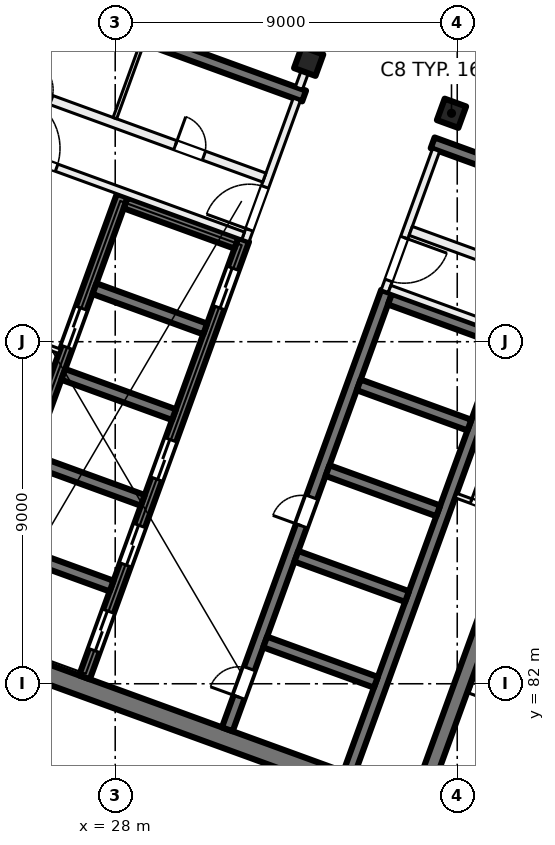
"""IFC4 building model, lengths in metres.
Left out: names, types, materials, properties, quantities, classifications, styles, units other than length and angle.
Written with IfcOpenShell. Run it as: python <this file> out.ifc"""

import sys

from ifc_helpers import new_model, si_unit, direction, frame, frame_2d, origin, origin_2d, place, context, subcontext, project, spatial, rectangle, extrude, element, fill, save


model = new_model("IFC4")
c1 = context("Model", 3, precision=1e-05, world=origin(), true_north=direction((0.0, 1.0)))
c2 = subcontext(c1, "Body", "Model", "MODEL_VIEW")
j1 = project(units=[si_unit("LENGTHUNIT", "METRE"), si_unit("PLANEANGLEUNIT", "RADIAN")], contexts=[c1])
p1 = place(None, origin())
s1 = spatial("IfcSite", under=j1, at=p1, CompositionType="ELEMENT")
p2 = place(p1, origin())
s2 = spatial("IfcBuilding", under=s1, at=p2, CompositionType="ELEMENT")
p3 = place(p2, frame((0.0, 0.0, 216.0)))
s3 = spatial("IfcBuildingStorey", under=s2, at=p3, CompositionType="ELEMENT", Elevation=216.0)
for number, where, z_axis, x_axis in (
    (1, (36.849, 97.011, 0.0), (0.0, 0.0, 1.0), (-0.342, -0.94, 0.0)),
    (2, (33.091, 98.379, 0.0), (0.0, 0.0, 1.0), (-0.342, -0.94, 0.0)),
):
    element("IfcColumn", number, at=place(p3, frame(where, z_axis=z_axis, x_axis=x_axis)), inside=s3, PredefinedType="COLUMN", context=c2, shape_type="SweptSolid", body=[
        extrude(rectangle(XDim=0.6, YDim=0.6, at=origin_2d()), origin(), (0.0, 0.0, 1.0), 4.0),
    ])
p4 = place(p3, frame((35.75, 78.788, 0.0), z_axis=(0.0, 0.0, 1.0), x_axis=(-0.939692894512, 0.342019391267, 0.0)))
e3 = element("IfcWall", 3, at=p4, inside=s3, PredefinedType="SHEAR", context=c2, shape_type="SweptSolid", body=[
    extrude(rectangle(XDim=14.4, YDim=0.5, at=frame_2d((7.2, 0.0))), origin(), (0.0, 0.0, 1.0), 4.0),
])
p5 = place(p3, frame((36.058, 79.048, 0.0), z_axis=(0.0, 0.0, 1.0), x_axis=(0.342016982193, 0.939693771338, 0.0)))
e4 = element("IfcWall", 4, at=p5, inside=s3, PredefinedType="SHEAR", context=c2, shape_type="SweptSolid", body=[
    extrude(rectangle(XDim=7.8, YDim=0.4, at=frame_2d((3.9, 0.0))), origin(), (0.0, 0.0, 1.0), 4.0),
])
p6 = place(p3, frame((30.949, 80.801, 0.0), z_axis=(0.0, 0.0, 1.0), x_axis=(0.342016684409, 0.939693879721, 0.0)))
e5 = element("IfcWall", 5, at=p6, inside=s3, PredefinedType="SHEAR", context=c2, shape_type="SweptSolid", body=[
    extrude(rectangle(XDim=12.25, YDim=0.3, at=frame_2d((6.125, 0.0))), origin(), (0.0, 0.0, 1.0), 4.0),
])
p7 = place(p6, frame((0.9, 0.0, 0.0)))
e6 = element("IfcOpeningElement", 6, at=p7, cuts=e5, PredefinedType="OPENING", context=c2, shape_type="SweptSolid", body=[
    extrude(rectangle(XDim=0.8, YDim=2.1, at=frame_2d((0.4, 1.05))), frame((0.0, 0.16, 0.0), z_axis=(0.0, -1.0, 0.0), x_axis=(1.0, 0.0, 0.0)), (0.0, 0.0, 1.0), 0.32),
])
p8 = place(p6, frame((5.7, 0.0, 0.0)))
e7 = element("IfcOpeningElement", 7, at=p8, cuts=e5, PredefinedType="OPENING", context=c2, shape_type="SweptSolid", body=[
    extrude(rectangle(XDim=0.8, YDim=2.1, at=frame_2d((0.4, 1.05))), frame((0.0, 0.16, 0.0), z_axis=(0.0, -1.0, 0.0), x_axis=(1.0, 0.0, 0.0)), (0.0, 0.0, 1.0), 0.32),
])
p9 = place(p3, frame((34.144, 79.638, 0.0), z_axis=(0.0, 0.0, 1.0), x_axis=(0.342016684409, 0.939693879721, 0.0)))
e8 = element("IfcWall", 8, at=p9, inside=s3, PredefinedType="SHEAR", context=c2, shape_type="SweptSolid", body=[
    extrude(rectangle(XDim=12.25, YDim=0.3, at=frame_2d((6.125, 0.0))), origin(), (0.0, 0.0, 1.0), 4.0),
])
p10 = place(p3, frame((34.858, 82.039, 0.0), z_axis=(0.0, 0.0, 1.0), x_axis=(-0.939689908313, 0.342027595692, 0.0)))
e9 = element("IfcWall", 9, at=p10, inside=s3, PredefinedType="SHEAR", context=c2, shape_type="SweptSolid", body=[
    extrude(rectangle(XDim=3.1, YDim=0.3, at=frame_2d((1.55, 0.0))), origin(), (0.0, 0.0, 1.0), 4.0),
])
p11 = place(p3, frame((35.679, 84.294, 0.0), z_axis=(0.0, 0.0, 1.0), x_axis=(-0.939706007505, 0.341983361377, 0.0)))
e10 = element("IfcWall", 10, at=p11, inside=s3, PredefinedType="SHEAR", context=c2, shape_type="SweptSolid", body=[
    extrude(rectangle(XDim=3.1, YDim=0.3, at=frame_2d((1.55, 0.0))), origin(), (0.0, 0.0, 1.0), 4.0),
])
for number, where, z_axis, x_axis in (
    (11, (36.5, 86.549, 0.0), (0.0, 0.0, 1.0), (-0.94, 0.342, 0.0)),
    (12, (37.321, 88.805, 0.0), (0.0, 0.0, 1.0), (-0.94, 0.342, 0.0)),
    (13, (38.142, 91.06, 0.0), (0.0, 0.0, 1.0), (-0.94, 0.342, 0.0)),
):
    element("IfcWall", number, at=place(p3, frame(where, z_axis=z_axis, x_axis=x_axis)), inside=s3, PredefinedType="SHEAR", context=c2, shape_type="SweptSolid", body=[
        extrude(rectangle(XDim=3.1, YDim=0.3, at=frame_2d((1.55, 0.0))), origin(), (0.0, 0.0, 1.0), 4.0),
    ])
p12 = place(p3, frame((27.191, 82.169, 0.0), z_axis=(0.0, 0.0, 1.0), x_axis=(0.342016684409, 0.939693879721, 0.0)))
e14 = element("IfcWall", 14, at=p12, inside=s3, PredefinedType="SHEAR", context=c2, shape_type="SweptSolid", body=[
    extrude(rectangle(XDim=12.25, YDim=0.3, at=frame_2d((6.125, 0.0))), origin(), (0.0, 0.0, 1.0), 4.0),
])
p13 = place(p12, frame((0.75, 0.0, 0.0)))
e15 = element("IfcOpeningElement", 15, at=p13, cuts=e14, PredefinedType="OPENING", context=c2, shape_type="SweptSolid", body=[
    extrude(rectangle(XDim=1.1, YDim=2.1, at=frame_2d((0.55, 1.05))), frame((0.0, 0.16, 0.0), z_axis=(0.0, -1.0, 0.0), x_axis=(1.0, 0.0, 0.0)), (0.0, 0.0, 1.0), 0.32),
])
p14 = place(p12, frame((3.15, 0.0, 0.0)))
e16 = element("IfcOpeningElement", 16, at=p14, cuts=e14, PredefinedType="OPENING", context=c2, shape_type="SweptSolid", body=[
    extrude(rectangle(XDim=1.1, YDim=2.1, at=frame_2d((0.55, 1.05))), frame((0.0, 0.16, 0.0), z_axis=(0.0, -1.0, 0.0), x_axis=(1.0, 0.0, 0.0)), (0.0, 0.0, 1.0), 0.32),
])
p15 = place(p12, frame((5.55, 0.0, 0.0)))
e17 = element("IfcOpeningElement", 17, at=p15, cuts=e14, PredefinedType="OPENING", context=c2, shape_type="SweptSolid", body=[
    extrude(rectangle(XDim=1.1, YDim=2.1, at=frame_2d((0.55, 1.05))), frame((0.0, 0.16, 0.0), z_axis=(0.0, -1.0, 0.0), x_axis=(1.0, 0.0, 0.0)), (0.0, 0.0, 1.0), 0.32),
])
p16 = place(p12, frame((10.35, 0.0, 0.0)))
e18 = element("IfcOpeningElement", 18, at=p16, cuts=e14, PredefinedType="OPENING", context=c2, shape_type="SweptSolid", body=[
    extrude(rectangle(XDim=1.1, YDim=2.1, at=frame_2d((0.55, 1.05))), frame((0.0, 0.16, 0.0), z_axis=(0.0, -1.0, 0.0), x_axis=(1.0, 0.0, 0.0)), (0.0, 0.0, 1.0), 0.32),
])
p17 = place(p3, frame((23.996, 83.332, 0.0), z_axis=(0.0, 0.0, 1.0), x_axis=(0.342016684409, 0.939693879721, 0.0)))
e19 = element("IfcWall", 19, at=p17, inside=s3, PredefinedType="SHEAR", context=c2, shape_type="SweptSolid", body=[
    extrude(rectangle(XDim=12.25, YDim=0.3, at=frame_2d((6.125, 0.0))), origin(), (0.0, 0.0, 1.0), 4.0),
])
p18 = place(p17, frame((8.0, 0.0, 0.0)))
e20 = element("IfcOpeningElement", 20, at=p18, cuts=e19, PredefinedType="OPENING", context=c2, shape_type="SweptSolid", body=[
    extrude(rectangle(XDim=1.1, YDim=2.1, at=frame_2d((0.55, 1.05))), frame((0.0, 0.16, 0.0), z_axis=(0.0, -1.0, 0.0), x_axis=(1.0, 0.0, 0.0)), (0.0, 0.0, 1.0), 0.32),
])
for number, where, z_axis, x_axis in (
    (21, (27.905, 84.57, 0.0), (0.0, 0.0, 1.0), (-0.94, 0.342, 0.0)),
    (22, (28.726, 86.825, 0.0), (0.0, 0.0, 1.0), (-0.94, 0.342, 0.0)),
    (23, (29.546, 89.08, 0.0), (0.0, 0.0, 1.0), (-0.94, 0.342, 0.0)),
):
    element("IfcWall", number, at=place(p3, frame(where, z_axis=z_axis, x_axis=x_axis)), inside=s3, PredefinedType="SHEAR", context=c2, shape_type="SweptSolid", body=[
        extrude(rectangle(XDim=3.1, YDim=0.3, at=frame_2d((1.55, 0.0))), origin(), (0.0, 0.0, 1.0), 4.0),
    ])
for number, where, z_axis, x_axis in (
    (24, (30.367, 91.336, 0.0), (0.0, 0.0, 1.0), (-0.94, 0.342, 0.0)),
    (25, (31.188, 93.591, 0.0), (0.0, 0.0, 1.0), (-0.94, 0.342, 0.0)),
):
    element("IfcWall", number, at=place(p3, frame(where, z_axis=z_axis, x_axis=x_axis)), inside=s3, PredefinedType="SHEAR", context=c2, shape_type="SweptSolid", body=[
        extrude(rectangle(XDim=3.1, YDim=0.3, at=frame_2d((1.55, 0.0))), origin(), (0.0, 0.0, 1.0), 4.0),
    ])
p19 = place(p3, frame((44.529, 93.258, 0.0), z_axis=(0.0, 0.0, 1.0), x_axis=(-0.9396917844, 0.342022441267, 0.0)))
e26 = element("IfcWall", 26, at=p19, inside=s3, PredefinedType="SHEAR", context=c2, shape_type="SweptSolid", body=[
    extrude(rectangle(XDim=8.7, YDim=0.3, at=frame_2d((4.35, 0.0))), origin(), (0.0, 0.0, 1.0), 4.0),
])
p20 = place(p3, frame((32.971, 97.465, 0.0), z_axis=(0.0, 0.0, 1.0), x_axis=(-0.939695066972, 0.34201342241, 0.0)))
e27 = element("IfcWall", 27, at=p20, inside=s3, PredefinedType="SHEAR", context=c2, shape_type="SweptSolid", body=[
    extrude(rectangle(XDim=8.7, YDim=0.3, at=frame_2d((4.35, 0.0))), origin(), (0.0, 0.0, 1.0), 4.0),
])
p21 = place(p3, frame((31.427, 93.663, 0.0), z_axis=(0.0, 0.0, 1.0), x_axis=(0.342030870568, 0.93968871632, 0.0)))
e28 = element("IfcWall", 28, at=p21, inside=s3, PredefinedType="PARTITIONING", context=c2, shape_type="SweptSolid", body=[
    extrude(rectangle(XDim=3.95, YDim=0.2, at=frame_2d((1.975, 0.0))), origin(), (0.0, 0.0, 1.0), 3.625),
])
p22 = place(p21, frame((0.3, 0.0, 0.0)))
e29 = element("IfcOpeningElement", 29, at=p22, cuts=e28, PredefinedType="OPENING", context=c2, shape_type="SweptSolid", body=[
    extrude(rectangle(XDim=1.2, YDim=2.1, at=frame_2d((0.6, 1.05))), frame((0.0, 0.11, 0.0), z_axis=(0.0, -1.0, 0.0), x_axis=(1.0, 0.0, 0.0)), (0.0, 0.0, 1.0), 0.22),
])
p23 = place(p3, frame((23.427, 96.682, 0.0), z_axis=(0.0, 0.0, 1.0), x_axis=(0.939690465531, -0.342026064782, 0.0)))
e30 = element("IfcWall", 30, at=p23, inside=s3, PredefinedType="PARTITIONING", context=c2, shape_type="SweptSolid", body=[
    extrude(rectangle(XDim=8.45, YDim=0.2, at=frame_2d((4.225, 0.0))), origin(), (0.0, 0.0, 1.0), 3.625),
])
p24 = place(p23, frame((1.725, 0.0, 0.0)))
e31 = element("IfcOpeningElement", 31, at=p24, cuts=e30, PredefinedType="OPENING", context=c2, shape_type="SweptSolid", body=[
    extrude(rectangle(XDim=1.5, YDim=2.1, at=frame_2d((0.75, 1.05))), frame((0.0, 0.11, 0.0), z_axis=(0.0, -1.0, 0.0), x_axis=(1.0, 0.0, 0.0)), (0.0, 0.0, 1.0), 0.22),
])
p25 = place(p3, frame((23.983, 98.208, 0.0), z_axis=(0.0, 0.0, 1.0), x_axis=(0.939699751196, -0.342000552051, 0.0)))
e32 = element("IfcWall", 32, at=p25, inside=s3, PredefinedType="PARTITIONING", context=c2, shape_type="SweptSolid", body=[
    extrude(rectangle(XDim=8.45, YDim=0.25, at=frame_2d((4.225, 0.0))), origin(), (0.0, 0.0, 1.0), 3.625),
])
p26 = place(p25, frame((5.96, 0.0, 0.0)))
e33 = element("IfcOpeningElement", 33, at=p26, cuts=e32, PredefinedType="OPENING", context=c2, shape_type="SweptSolid", body=[
    extrude(rectangle(XDim=0.8, YDim=2.1, at=frame_2d((0.4, 1.05))), frame((0.0, 0.135, 0.0), z_axis=(0.0, -1.0, 0.0), x_axis=(1.0, 0.0, 0.0)), (0.0, 0.0, 1.0), 0.27),
])
p27 = place(p25, frame((1.685, 0.0, 0.0)))
e34 = element("IfcOpeningElement", 34, at=p27, cuts=e32, PredefinedType="OPENING", context=c2, shape_type="SweptSolid", body=[
    extrude(rectangle(XDim=0.8, YDim=2.1, at=frame_2d((0.4, 1.05))), frame((0.0, 0.135, 0.0), z_axis=(0.0, -1.0, 0.0), x_axis=(1.0, 0.0, 0.0)), (0.0, 0.0, 1.0), 0.27),
])
p28 = place(p3, frame((24.985, 91.312, 0.0), z_axis=(0.0, 0.0, 1.0), x_axis=(0.939719959755, -0.341945020783, 0.0)))
e35 = element("IfcWall", 35, at=p28, inside=s3, PredefinedType="PARTITIONING", context=c2, shape_type="SweptSolid", body=[
    extrude(rectangle(XDim=1.65, YDim=0.125, at=frame_2d((0.825, 0.0))), origin(), (0.0, 0.0, 1.0), 3.625),
])
p29 = place(p28, frame((0.425, 0.0, 0.0)))
e36 = element("IfcOpeningElement", 36, at=p29, cuts=e35, PredefinedType="OPENING", context=c2, shape_type="SweptSolid", body=[
    extrude(rectangle(XDim=0.8, YDim=2.1, at=frame_2d((0.4, 1.05))), frame((0.0, 0.073, 0.0), z_axis=(0.0, -1.0, 0.0), x_axis=(1.0, 0.0, 0.0)), (0.0, 0.0, 1.0), 0.145),
])
p30 = place(p3, frame((27.991, 96.883, 0.0), z_axis=(0.0, 0.0, 1.0), x_axis=(0.342023078919, 0.939691552312, 0.0)))
e37 = element("IfcWall", 37, at=p30, inside=s3, PredefinedType="PARTITIONING", context=c2, shape_type="SweptSolid", body=[
    extrude(rectangle(XDim=2.1, YDim=0.1, at=frame_2d((1.05, 0.0))), origin(), (0.0, 0.0, 1.0), 3.625),
])
p31 = place(p3, frame((36.443, 96.041, 0.0), z_axis=(0.0, 0.0, 1.0), x_axis=(-0.341996156931, -0.939701350773, 0.0)))
e38 = element("IfcWall", 38, at=p31, inside=s3, PredefinedType="PARTITIONING", context=c2, shape_type="SweptSolid", body=[
    extrude(rectangle(XDim=3.95, YDim=0.2, at=frame_2d((1.975, 0.0))), origin(), (0.0, 0.0, 1.0), 3.625),
])
p32 = place(p31, frame((2.45, 0.0, 0.0)))
e39 = element("IfcOpeningElement", 39, at=p32, cuts=e38, PredefinedType="OPENING", context=c2, shape_type="SweptSolid", body=[
    extrude(rectangle(XDim=1.2, YDim=2.1, at=frame_2d((0.6, 1.05))), frame((0.0, 0.11, 0.0), z_axis=(0.0, -1.0, 0.0), x_axis=(1.0, 0.0, 0.0)), (0.0, 0.0, 1.0), 0.22),
])
p33 = place(p3, frame((35.22, 92.389, 0.0), z_axis=(0.0, 0.0, 1.0), x_axis=(0.939690465531, -0.342026064782, 0.0)))
e40 = element("IfcWall", 40, at=p33, inside=s3, PredefinedType="PARTITIONING", context=c2, shape_type="SweptSolid", body=[
    extrude(rectangle(XDim=8.45, YDim=0.2, at=frame_2d((4.225, 0.0))), origin(), (0.0, 0.0, 1.0), 3.625),
])
p34 = place(p33, frame((5.225, 0.0, 0.0)))
e41 = element("IfcOpeningElement", 41, at=p34, cuts=e40, PredefinedType="OPENING", context=c2, shape_type="SweptSolid", body=[
    extrude(rectangle(XDim=1.5, YDim=2.1, at=frame_2d((0.75, 1.05))), frame((0.0, 0.11, 0.0), z_axis=(0.0, -1.0, 0.0), x_axis=(1.0, 0.0, 0.0)), (0.0, 0.0, 1.0), 0.22),
])
p35 = place(p3, frame((35.776, 93.916, 0.0), z_axis=(0.0, 0.0, 1.0), x_axis=(0.939690465531, -0.342026064782, 0.0)))
e42 = element("IfcWall", 42, at=p35, inside=s3, PredefinedType="PARTITIONING", context=c2, shape_type="SweptSolid", body=[
    extrude(rectangle(XDim=8.45, YDim=0.25, at=frame_2d((4.225, 0.0))), origin(), (0.0, 0.0, 1.0), 3.625),
])
p36 = place(p35, frame((2.29, 0.0, 0.0)))
e43 = element("IfcOpeningElement", 43, at=p36, cuts=e42, PredefinedType="OPENING", context=c2, shape_type="SweptSolid", body=[
    extrude(rectangle(XDim=1.0, YDim=2.1, at=frame_2d((0.5, 1.05))), frame((0.0, 0.135, 0.0), z_axis=(0.0, -1.0, 0.0), x_axis=(1.0, 0.0, 0.0)), (0.0, 0.0, 1.0), 0.27),
])
p37 = place(p35, frame((6.565, 0.0, 0.0)))
e44 = element("IfcOpeningElement", 44, at=p37, cuts=e42, PredefinedType="OPENING", context=c2, shape_type="SweptSolid", body=[
    extrude(rectangle(XDim=1.0, YDim=2.1, at=frame_2d((0.5, 1.05))), frame((0.0, 0.135, 0.0), z_axis=(0.0, -1.0, 0.0), x_axis=(1.0, 0.0, 0.0)), (0.0, 0.0, 1.0), 0.27),
])
p38 = place(p3, frame((36.966, 86.952, 0.0), z_axis=(0.0, 0.0, 1.0), x_axis=(0.939672407396, -0.342075674051, 0.0)))
e45 = element("IfcWall", 45, at=p38, inside=s3, PredefinedType="PARTITIONING", context=c2, shape_type="SweptSolid", body=[
    extrude(rectangle(XDim=1.65, YDim=0.125, at=frame_2d((0.825, 0.0))), origin(), (0.0, 0.0, 1.0), 3.625),
])
p39 = place(p38, frame((0.425, 0.0, 0.0)))
e46 = element("IfcOpeningElement", 46, at=p39, cuts=e45, PredefinedType="OPENING", context=c2, shape_type="SweptSolid", body=[
    extrude(rectangle(XDim=0.8, YDim=2.1, at=frame_2d((0.4, 1.05))), frame((0.0, 0.073, 0.0), z_axis=(0.0, -1.0, 0.0), x_axis=(1.0, 0.0, 0.0)), (0.0, 0.0, 1.0), 0.145),
])
p40 = place(p3, frame((32.834, 97.674, 0.0), z_axis=(0.0, 0.0, 1.0), x_axis=(0.342017493073, 0.939693585395, 0.0)))
e47 = element("IfcWall", 47, at=p40, inside=s3, PredefinedType="PARTITIONING", context=c2, shape_type="SweptSolid", body=[
    extrude(rectangle(XDim=3.5, YDim=0.2, at=frame_2d((1.75, 0.0))), origin(), (0.0, 0.0, 1.0), 3.625),
])
p41 = place(p3, frame((34.091, 100.835, 0.0), z_axis=(0.0, 0.0, 1.0), x_axis=(0.939702148643, -0.341993964619, 0.0)))
e48 = element("IfcWall", 48, at=p41, inside=s3, PredefinedType="PARTITIONING", context=c2, shape_type="SweptSolid", body=[
    extrude(rectangle(XDim=10.0, YDim=0.2, at=frame_2d((5.0, 0.0))), origin(), (0.0, 0.0, 1.0), 3.625),
])
p42 = place(p13, origin())
e49 = element("IfcDoor", 49, at=p42, inside=s3, OperationType="DOUBLE_DOOR_SLIDING", PredefinedType="DOOR", context=c2, shape_type="SweptSolid", body=[
    extrude(rectangle(XDim=1.1, YDim=2.1, at=frame_2d((0.55, 1.05))), frame((0.0, 0.025, 0.0), z_axis=(0.0, -1.0, 0.0), x_axis=(1.0, 0.0, 0.0)), (0.0, 0.0, 1.0), 0.05),
])
fill(e15, e49)
p43 = place(p14, origin())
e50 = element("IfcDoor", 50, at=p43, inside=s3, OperationType="DOUBLE_DOOR_SLIDING", PredefinedType="DOOR", context=c2, shape_type="SweptSolid", body=[
    extrude(rectangle(XDim=1.1, YDim=2.1, at=frame_2d((0.55, 1.05))), frame((0.0, 0.025, 0.0), z_axis=(0.0, -1.0, 0.0), x_axis=(1.0, 0.0, 0.0)), (0.0, 0.0, 1.0), 0.05),
])
fill(e16, e50)
p44 = place(p15, origin())
e51 = element("IfcDoor", 51, at=p44, inside=s3, OperationType="DOUBLE_DOOR_SLIDING", PredefinedType="DOOR", context=c2, shape_type="SweptSolid", body=[
    extrude(rectangle(XDim=1.1, YDim=2.1, at=frame_2d((0.55, 1.05))), frame((0.0, 0.025, 0.0), z_axis=(0.0, -1.0, 0.0), x_axis=(1.0, 0.0, 0.0)), (0.0, 0.0, 1.0), 0.05),
])
fill(e17, e51)
p45 = place(p16, origin())
e52 = element("IfcDoor", 52, at=p45, inside=s3, OperationType="DOUBLE_DOOR_SLIDING", PredefinedType="DOOR", context=c2, shape_type="SweptSolid", body=[
    extrude(rectangle(XDim=1.1, YDim=2.1, at=frame_2d((0.55, 1.05))), frame((0.0, 0.025, 0.0), z_axis=(0.0, -1.0, 0.0), x_axis=(1.0, 0.0, 0.0)), (0.0, 0.0, 1.0), 0.05),
])
fill(e18, e52)
p46 = place(p7, origin())
e53 = element("IfcDoor", 53, at=p46, inside=s3, OperationType="SINGLE_SWING_LEFT", PredefinedType="DOOR", context=c2, shape_type="SweptSolid", body=[
    extrude(rectangle(XDim=0.8, YDim=2.1, at=frame_2d((0.4, 1.05))), frame((0.0, 0.025, 0.0), z_axis=(0.0, -1.0, 0.0), x_axis=(1.0, 0.0, 0.0)), (0.0, 0.0, 1.0), 0.05),
])
fill(e6, e53)
p47 = place(p8, origin())
e54 = element("IfcDoor", 54, at=p47, inside=s3, OperationType="SINGLE_SWING_RIGHT", PredefinedType="DOOR", context=c2, shape_type="SweptSolid", body=[
    extrude(rectangle(XDim=0.8, YDim=2.1, at=frame_2d((0.4, 1.05))), frame((0.0, 0.025, 0.0), z_axis=(0.0, -1.0, 0.0), x_axis=(1.0, 0.0, 0.0)), (0.0, 0.0, 1.0), 0.05),
])
fill(e7, e54)
p48 = place(p22, origin())
e55 = element("IfcDoor", 55, at=p48, inside=s3, OperationType="DOUBLE_DOOR_SINGLE_SWING", PredefinedType="DOOR", context=c2, shape_type="SweptSolid", body=[
    extrude(rectangle(XDim=1.2, YDim=2.1, at=frame_2d((0.6, 1.05))), frame((0.0, 0.025, 0.0), z_axis=(0.0, -1.0, 0.0), x_axis=(1.0, 0.0, 0.0)), (0.0, 0.0, 1.0), 0.05),
])
fill(e29, e55)
p49 = place(p24, origin())
e56 = element("IfcDoor", 56, at=p49, inside=s3, OperationType="DOUBLE_DOOR_SINGLE_SWING", PredefinedType="DOOR", context=c2, shape_type="SweptSolid", body=[
    extrude(rectangle(XDim=1.5, YDim=2.1, at=frame_2d((0.75, 1.05))), frame((0.0, 0.025, 0.0), z_axis=(0.0, -1.0, 0.0), x_axis=(1.0, 0.0, 0.0)), (0.0, 0.0, 1.0), 0.05),
])
fill(e31, e56)
p50 = place(p26, origin())
e57 = element("IfcDoor", 57, at=p50, inside=s3, OperationType="SINGLE_SWING_LEFT", PredefinedType="DOOR", context=c2, shape_type="SweptSolid", body=[
    extrude(rectangle(XDim=0.8, YDim=2.1, at=frame_2d((0.4, 1.05))), frame((0.0, 0.025, 0.0), z_axis=(0.0, -1.0, 0.0), x_axis=(1.0, 0.0, 0.0)), (0.0, 0.0, 1.0), 0.05),
])
fill(e33, e57)
p51 = place(p32, origin())
e58 = element("IfcDoor", 58, at=p51, inside=s3, OperationType="DOUBLE_DOOR_SINGLE_SWING", PredefinedType="DOOR", context=c2, shape_type="SweptSolid", body=[
    extrude(rectangle(XDim=1.2, YDim=2.1, at=frame_2d((0.6, 1.05))), frame((0.0, 0.025, 0.0), z_axis=(0.0, -1.0, 0.0), x_axis=(1.0, 0.0, 0.0)), (0.0, 0.0, 1.0), 0.05),
])
fill(e39, e58)
p52 = place(p39, origin())
e59 = element("IfcDoor", 59, at=p52, inside=s3, OperationType="SINGLE_SWING_LEFT", PredefinedType="DOOR", context=c2, shape_type="SweptSolid", body=[
    extrude(rectangle(XDim=0.8, YDim=2.1, at=frame_2d((0.4, 1.05))), frame((0.0, 0.025, 0.0), z_axis=(0.0, -1.0, 0.0), x_axis=(1.0, 0.0, 0.0)), (0.0, 0.0, 1.0), 0.05),
])
fill(e46, e59)
p53 = place(p18, origin())
e60 = element("IfcDoor", 60, at=p53, inside=s3, OperationType="DOUBLE_DOOR_SLIDING", PredefinedType="DOOR", context=c2, shape_type="SweptSolid", body=[
    extrude(rectangle(XDim=1.1, YDim=2.1, at=frame_2d((0.55, 1.05))), frame((0.0, 0.025, 0.0), z_axis=(0.0, -1.0, 0.0), x_axis=(1.0, 0.0, 0.0)), (0.0, 0.0, 1.0), 0.05),
])
fill(e20, e60)
save(model, sys.argv[1])
